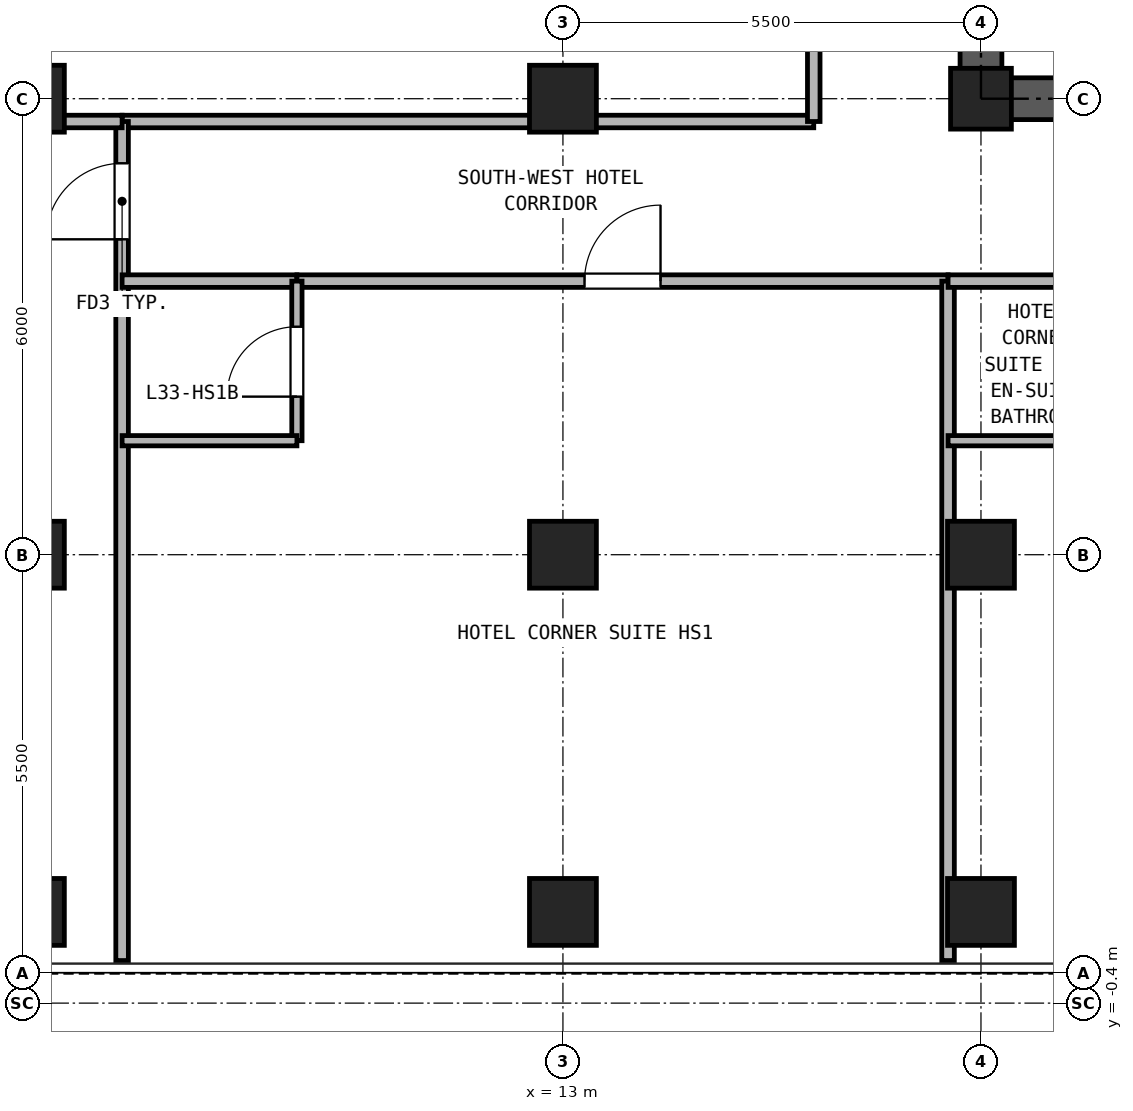
"""IFC4 building model, lengths in metres.
Left out: names, types, materials, properties, quantities, classifications, styles, units other than length and angle.
Written with IfcOpenShell. Run it as: python <this file> out.ifc"""

import sys

from ifc_helpers import new_model, si_unit, direction, frame, frame_2d, origin, origin_2d, place, context, subcontext, project, spatial, rectangle, hollow_rectangle, extrude, source, transform, mapped, element, fill, save


model = new_model("IFC4")
c1 = context("Model", 3, precision=1e-05, world=origin(), true_north=direction((0.0, 1.0)))
c2 = subcontext(c1, "Body", "Model", "MODEL_VIEW")
j1 = project(units=[si_unit("LENGTHUNIT", "METRE"), si_unit("PLANEANGLEUNIT", "RADIAN")], contexts=[c1])
p1 = place(None, origin())
s1 = spatial("IfcSite", under=j1, at=p1, CompositionType="ELEMENT")
p2 = place(p1, origin())
s2 = spatial("IfcBuilding", under=s1, at=p2, CompositionType="ELEMENT")
p3 = place(p2, frame((0.0, 0.0, 121.5)))
s3 = spatial("IfcBuildingStorey", under=s2, at=p3, CompositionType="ELEMENT", Elevation=121.5)
m1 = source(origin(), c2, "Body", "SweptSolid", [
    extrude(hollow_rectangle(XDim=0.88, YDim=0.88, WallThickness=0.05, at=origin_2d()), origin(), (0.0, 0.0, 1.0), 2.95),
])
for number, where, z_axis, x_axis in (
    (1, (6.0, 0.8, 0.0), (0.0, 0.0, 1.0), (1.0, 0.0, 0.0)),
    (2, (13.0, 0.8, 0.0), (0.0, 0.0, 1.0), (1.0, 0.0, 0.0)),
    (3, (18.5, 0.8, 0.0), (0.0, 0.0, 1.0), (1.0, 0.0, 0.0)),
    (4, (6.0, 5.5, 0.0), (0.0, 0.0, 1.0), (1.0, 0.0, 0.0)),
    (5, (6.0, 11.5, 0.0), (0.0, 0.0, 1.0), (1.0, 0.0, 0.0)),
    (6, (13.0, 5.5, 0.0), (0.0, 0.0, 1.0), (1.0, 0.0, 0.0)),
    (7, (13.0, 11.5, 0.0), (0.0, 0.0, 1.0), (1.0, 0.0, 0.0)),
    (8, (18.5, 5.5, 0.0), (0.0, 0.0, 1.0), (1.0, 0.0, 0.0)),
):
    element("IfcColumn", number, at=place(p3, frame(where, z_axis=z_axis, x_axis=x_axis)), inside=s3, PredefinedType="COLUMN", context=c2, shape_type="MappedRepresentation", body=[
        mapped(m1, transform((0.0, 0.0, 0.0), x_axis=(1.0, 0.0, 0.0), y_axis=(0.0, 1.0, 0.0), z_axis=(0.0, 0.0, 1.0), scale=1.0)),
    ])
m2 = source(origin(), c2, "Body", "SweptSolid", [
    extrude(hollow_rectangle(XDim=0.8, YDim=0.8, WallThickness=0.045, at=origin_2d()), origin(), (0.0, 0.0, 1.0), 2.95),
])
p4 = place(p3, frame((18.5, 11.5, 0.0), z_axis=(0.0, 0.0, 1.0), x_axis=(1.0, 0.0, 0.0)))
e9 = element("IfcColumn", 9, at=p4, inside=s3, PredefinedType="COLUMN", context=c2, shape_type="MappedRepresentation", body=[
    mapped(m2, transform((0.0, 0.0, 0.0), x_axis=(1.0, 0.0, 0.0), y_axis=(0.0, 1.0, 0.0), z_axis=(0.0, 0.0, 1.0), scale=1.0)),
])
p5 = place(p3, frame((18.225, 11.5, 0.0), z_axis=(0.0, 0.0, 1.0), x_axis=(1.0, 0.0, 0.0)))
e10 = element("IfcWall", 10, at=p5, inside=s3, PredefinedType="SHEAR", context=c2, shape_type="SweptSolid", body=[
    extrude(rectangle(XDim=10.55, YDim=0.55, at=frame_2d((5.275, 0.0))), origin(), (0.0, 0.0, 1.0), 2.95),
])
p6 = place(p5, frame((2.375, 0.0, 0.0)))
e11 = element("IfcOpeningElement", 11, at=p6, cuts=e10, PredefinedType="OPENING", context=c2, shape_type="SweptSolid", body=[
    extrude(rectangle(XDim=0.95, YDim=2.15, at=frame_2d((0.475, 1.075))), frame((0.0, 0.285, 0.0), z_axis=(0.0, -1.0, 0.0), x_axis=(1.0, 0.0, 0.0)), (0.0, 0.0, 1.0), 0.57),
])
p7 = place(p5, frame((5.875, 0.0, 0.0)))
e12 = element("IfcOpeningElement", 12, at=p7, cuts=e10, PredefinedType="OPENING", context=c2, shape_type="SweptSolid", body=[
    extrude(rectangle(XDim=1.1, YDim=2.25, at=frame_2d((0.55, 1.125))), frame((0.0, 0.285, 0.0), z_axis=(0.0, -1.0, 0.0), x_axis=(1.0, 0.0, 0.0)), (0.0, 0.0, 1.0), 0.57),
])
p8 = place(p5, frame((8.275, 0.0, 0.0)))
e13 = element("IfcOpeningElement", 13, at=p8, cuts=e10, PredefinedType="OPENING", context=c2, shape_type="SweptSolid", body=[
    extrude(rectangle(XDim=1.1, YDim=2.25, at=frame_2d((0.55, 1.125))), frame((0.0, 0.285, 0.0), z_axis=(0.0, -1.0, 0.0), x_axis=(1.0, 0.0, 0.0)), (0.0, 0.0, 1.0), 0.57),
])
p9 = place(p3, frame((18.5, 11.775, 0.0), z_axis=(0.0, 0.0, 1.0), x_axis=(0.0, 1.0, 0.0)))
e14 = element("IfcWall", 14, at=p9, inside=s3, PredefinedType="SHEAR", context=c2, shape_type="SweptSolid", body=[
    extrude(rectangle(XDim=16.7, YDim=0.55, at=frame_2d((8.35, 0.0))), origin(), (0.0, 0.0, 1.0), 2.95),
])
p10 = place(p9, frame((7.375, 0.0, 0.0)))
e15 = element("IfcOpeningElement", 15, at=p10, cuts=e14, PredefinedType="OPENING", context=c2, shape_type="SweptSolid", body=[
    extrude(rectangle(XDim=1.15, YDim=2.2, at=frame_2d((0.575, 1.1))), frame((0.0, 0.285, 0.0), z_axis=(0.0, -1.0, 0.0), x_axis=(1.0, 0.0, 0.0)), (0.0, 0.0, 1.0), 0.57),
])
p11 = place(p3, frame((7.2, 11.2, 0.0), z_axis=(0.0, 0.0, 1.0), x_axis=(1.0, 0.0, 0.0)))
e16 = element("IfcWall", 16, at=p11, inside=s3, PredefinedType="PARTITIONING", context=c2, shape_type="SweptSolid", body=[
    extrude(rectangle(XDim=9.1, YDim=0.165, at=frame_2d((4.55, 0.0))), origin(), (0.0, 0.0, 1.0), 2.95),
])
p12 = place(p3, frame((16.3, 11.2, 0.0), z_axis=(0.0, 0.0, 1.0), x_axis=(0.0, 1.0, 0.0)))
e17 = element("IfcWall", 17, at=p12, inside=s3, PredefinedType="PARTITIONING", context=c2, shape_type="SweptSolid", body=[
    extrude(rectangle(XDim=18.75, YDim=0.165, at=frame_2d((9.375, 0.0))), origin(), (0.0, 0.0, 1.0), 2.95),
])
p13 = place(p12, frame((8.875, 0.0, 0.0)))
e18 = element("IfcOpeningElement", 18, at=p13, cuts=e17, PredefinedType="OPENING", context=c2, shape_type="SweptSolid", body=[
    extrude(rectangle(XDim=0.95, YDim=2.15, at=frame_2d((0.475, 1.075))), frame((0.0, 0.093, 0.0), z_axis=(0.0, -1.0, 0.0), x_axis=(1.0, 0.0, 0.0)), (0.0, 0.0, 1.0), 0.185),
])
p14 = place(p3, frame((7.2, 0.16, 0.0), z_axis=(0.0, 0.0, 1.0), x_axis=(0.0, 1.0, 0.0)))
e19 = element("IfcWall", 19, at=p14, inside=s3, PredefinedType="PARTITIONING", context=c2, shape_type="SweptSolid", body=[
    extrude(rectangle(XDim=11.04, YDim=0.165, at=frame_2d((5.52, 0.0))), origin(), (0.0, 0.0, 1.0), 2.95),
])
p15 = place(p14, frame((9.49, 0.0, 0.0)))
e20 = element("IfcOpeningElement", 20, at=p15, cuts=e19, PredefinedType="OPENING", context=c2, shape_type="SweptSolid", body=[
    extrude(rectangle(XDim=1.0, YDim=2.15, at=frame_2d((0.5, 1.075))), frame((0.0, 0.093, 0.0), z_axis=(0.0, -1.0, 0.0), x_axis=(1.0, 0.0, 0.0)), (0.0, 0.0, 1.0), 0.185),
])
p16 = place(p3, frame((0.16, 11.2, 0.0), z_axis=(0.0, 0.0, 1.0), x_axis=(1.0, 0.0, 0.0)))
e21 = element("IfcWall", 21, at=p16, inside=s3, PredefinedType="PARTITIONING", context=c2, shape_type="SweptSolid", body=[
    extrude(rectangle(XDim=7.04, YDim=0.165, at=frame_2d((3.52, 0.0))), origin(), (0.0, 0.0, 1.0), 2.95),
])
p17 = place(p3, frame((7.2, 9.1, 0.0), z_axis=(0.0, 0.0, 1.0), x_axis=(1.0, 0.0, 0.0)))
e22 = element("IfcWall", 22, at=p17, inside=s3, PredefinedType="PARTITIONING", context=c2, shape_type="SweptSolid", body=[
    extrude(rectangle(XDim=2.3, YDim=0.165, at=frame_2d((1.15, 0.0))), origin(), (0.0, 0.0, 1.0), 2.95),
])
p18 = place(p3, frame((9.5, 9.1, 0.0), z_axis=(0.0, 0.0, 1.0), x_axis=(1.0, 0.0, 0.0)))
e23 = element("IfcWall", 23, at=p18, inside=s3, PredefinedType="PARTITIONING", context=c2, shape_type="SweptSolid", body=[
    extrude(rectangle(XDim=8.567, YDim=0.165, at=frame_2d((4.283, 0.0))), origin(), (0.0, 0.0, 1.0), 2.95),
])
p19 = place(p18, frame((3.784, 0.0, 0.0)))
e24 = element("IfcOpeningElement", 24, at=p19, cuts=e23, PredefinedType="OPENING", context=c2, shape_type="SweptSolid", body=[
    extrude(rectangle(XDim=1.0, YDim=2.15, at=frame_2d((0.5, 1.075))), frame((0.0, 0.093, 0.0), z_axis=(0.0, -1.0, 0.0), x_axis=(1.0, 0.0, 0.0)), (0.0, 0.0, 1.0), 0.185),
])
p20 = place(p3, frame((9.5, 7.0, 0.0), z_axis=(0.0, 0.0, 1.0), x_axis=(0.0, 1.0, 0.0)))
e25 = element("IfcWall", 25, at=p20, inside=s3, PredefinedType="PARTITIONING", context=c2, shape_type="SweptSolid", body=[
    extrude(rectangle(XDim=2.1, YDim=0.135, at=frame_2d((1.05, 0.0))), origin(), (0.0, 0.0, 1.0), 2.95),
])
p21 = place(p20, frame((0.58, 0.0, 0.0)))
e26 = element("IfcOpeningElement", 26, at=p21, cuts=e25, PredefinedType="OPENING", context=c2, shape_type="SweptSolid", body=[
    extrude(rectangle(XDim=0.92, YDim=2.1, at=frame_2d((0.46, 1.05))), frame((0.0, 0.077, 0.0), z_axis=(0.0, -1.0, 0.0), x_axis=(1.0, 0.0, 0.0)), (0.0, 0.0, 1.0), 0.155),
])
p22 = place(p3, frame((7.2, 7.0, 0.0), z_axis=(0.0, 0.0, 1.0), x_axis=(1.0, 0.0, 0.0)))
e27 = element("IfcWall", 27, at=p22, inside=s3, PredefinedType="PARTITIONING", context=c2, shape_type="SweptSolid", body=[
    extrude(rectangle(XDim=2.3, YDim=0.135, at=frame_2d((1.15, 0.0))), origin(), (0.0, 0.0, 1.0), 2.95),
])
p23 = place(p3, frame((18.067, 0.16, 0.0), z_axis=(0.0, 0.0, 1.0), x_axis=(0.0, 1.0, 0.0)))
e28 = element("IfcWall", 28, at=p23, inside=s3, PredefinedType="PARTITIONING", context=c2, shape_type="SweptSolid", body=[
    extrude(rectangle(XDim=8.94, YDim=0.165, at=frame_2d((4.47, 0.0))), origin(), (0.0, 0.0, 1.0), 2.95),
])
p24 = place(p3, frame((18.067, 9.1, 0.0), z_axis=(0.0, 0.0, 1.0), x_axis=(1.0, 0.0, 0.0)))
e29 = element("IfcWall", 29, at=p24, inside=s3, PredefinedType="PARTITIONING", context=c2, shape_type="SweptSolid", body=[
    extrude(rectangle(XDim=2.3, YDim=0.165, at=frame_2d((1.15, 0.0))), origin(), (0.0, 0.0, 1.0), 2.95),
])
p25 = place(p3, frame((18.067, 7.0, 0.0), z_axis=(0.0, 0.0, 1.0), x_axis=(1.0, 0.0, 0.0)))
e30 = element("IfcWall", 30, at=p25, inside=s3, PredefinedType="PARTITIONING", context=c2, shape_type="SweptSolid", body=[
    extrude(rectangle(XDim=2.3, YDim=0.135, at=frame_2d((1.15, 0.0))), origin(), (0.0, 0.0, 1.0), 2.95),
])
p26 = place(p15, origin())
e31 = element("IfcDoor", 31, at=p26, inside=s3, OperationType="SINGLE_SWING_LEFT", PredefinedType="DOOR", context=c2, shape_type="SweptSolid", body=[
    extrude(rectangle(XDim=1.0, YDim=2.15, at=frame_2d((0.5, 1.075))), frame((0.0, 0.025, 0.0), z_axis=(0.0, -1.0, 0.0), x_axis=(1.0, 0.0, 0.0)), (0.0, 0.0, 1.0), 0.05),
])
fill(e20, e31)
p27 = place(p21, frame((0.92, 0.0, 0.0), z_axis=(0.0, 0.0, 1.0), x_axis=(-1.0, 0.0, 0.0)))
e32 = element("IfcDoor", 32, at=p27, inside=s3, OperationType="SINGLE_SWING_LEFT", PredefinedType="DOOR", context=c2, shape_type="SweptSolid", body=[
    extrude(rectangle(XDim=0.92, YDim=2.1, at=frame_2d((0.46, 1.05))), frame((0.0, 0.025, 0.0), z_axis=(0.0, -1.0, 0.0), x_axis=(1.0, 0.0, 0.0)), (0.0, 0.0, 1.0), 0.05),
])
fill(e26, e32)
p28 = place(p19, frame((1.0, 0.0, 0.0), z_axis=(0.0, 0.0, 1.0), x_axis=(-1.0, 0.0, 0.0)))
e33 = element("IfcDoor", 33, at=p28, inside=s3, OperationType="SINGLE_SWING_RIGHT", PredefinedType="DOOR", context=c2, shape_type="SweptSolid", body=[
    extrude(rectangle(XDim=1.0, YDim=2.15, at=frame_2d((0.5, 1.075))), frame((0.0, 0.025, 0.0), z_axis=(0.0, -1.0, 0.0), x_axis=(1.0, 0.0, 0.0)), (0.0, 0.0, 1.0), 0.05),
])
fill(e24, e33)
save(model, sys.argv[1])
